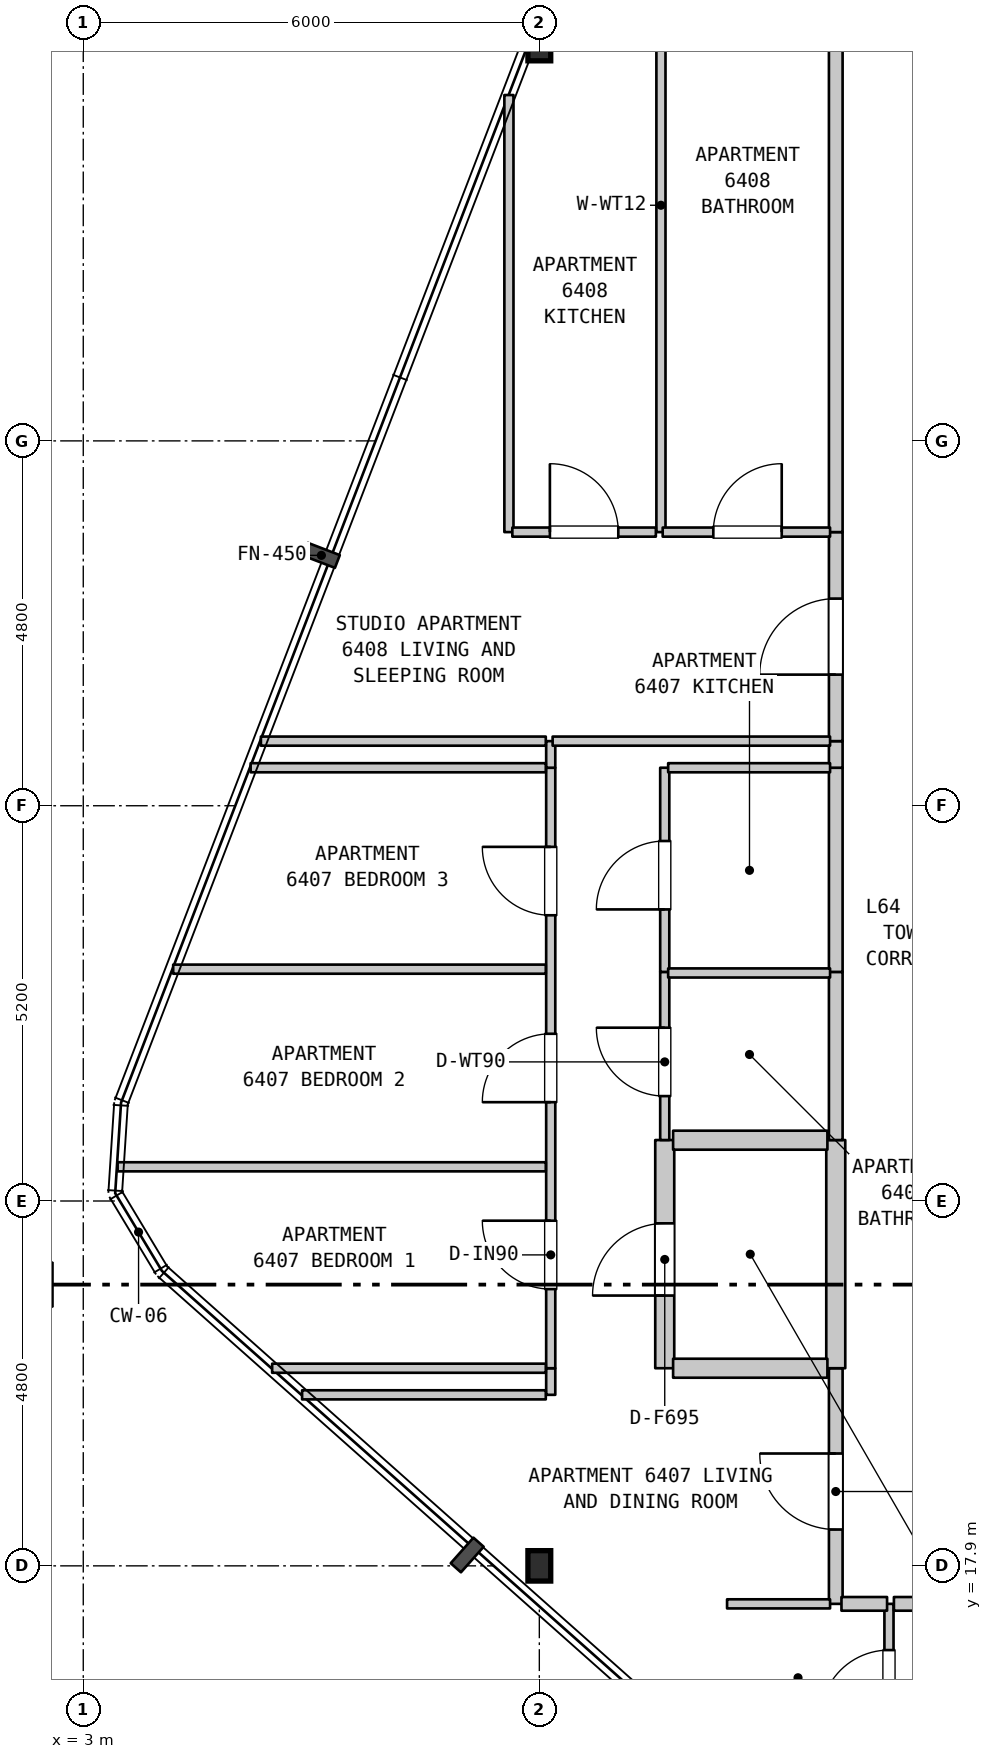
"""IFC4 building model, lengths in metres.
Left out: names, types, materials, properties, quantities, classifications, styles, units other than length and angle.
Written with IfcOpenShell. Run it as: python <this file> out.ifc"""

import sys

from ifc_helpers import new_model, si_unit, direction, frame, frame_2d, origin, origin_2d, place, context, subcontext, project, spatial, rectangle, i_section, extrude, element, fill, save


model = new_model("IFC4")
c1 = context("Model", 3, precision=1e-05, world=origin(), true_north=direction((0.0, 1.0)))
c2 = subcontext(c1, "Body", "Model", "MODEL_VIEW")
j1 = project(units=[si_unit("LENGTHUNIT", "METRE"), si_unit("PLANEANGLEUNIT", "RADIAN")], contexts=[c1])
p1 = place(None, origin())
s1 = spatial("IfcSite", under=j1, at=p1, CompositionType="ELEMENT")
p2 = place(p1, origin())
s2 = spatial("IfcBuilding", under=s1, at=p2, CompositionType="ELEMENT")
p3 = place(p2, frame((0.0, 0.0, 258.4)))
s3 = spatial("IfcBuildingStorey", under=s2, at=p3, CompositionType="ELEMENT", Elevation=258.4)
for number, where, z_axis, x_axis in (
    (1, (9.0, 17.9, 0.0), (0.0, 0.0, 1.0), (1.0, 0.0, 0.0)),
    (2, (9.0, 37.9, 0.0), (0.0, 0.0, 1.0), (1.0, 0.0, 0.0)),
):
    element("IfcColumn", number, at=place(p3, frame(where, z_axis=z_axis, x_axis=x_axis)), inside=s3, PredefinedType="COLUMN", context=c2, shape_type="SweptSolid", body=[
        extrude(i_section(OverallWidth=0.3, OverallDepth=0.4, WebThickness=0.013, FlangeThickness=0.024, FilletRadius=0.027, at=origin_2d()), origin(), (0.0, 0.0, 1.0), 3.7),
    ])
p4 = place(p3, frame((8.6, 31.5, 0.0), z_axis=(0.0, 0.0, 1.0), x_axis=(0.0, 1.0, 0.0)))
e3 = element("IfcWall", 3, at=p4, inside=s3, PredefinedType="PARTITIONING", context=c2, shape_type="SweptSolid", body=[
    extrude(rectangle(XDim=5.75, YDim=0.12, at=frame_2d((2.875, 0.0))), origin(), (0.0, 0.0, 1.0), 3.39),
])
p5 = place(p3, frame((9.15, 20.15, 0.0), z_axis=(0.0, 0.0, 1.0), x_axis=(0.0, 1.0, 0.0)))
e4 = element("IfcWall", 4, at=p5, inside=s3, PredefinedType="PARTITIONING", context=c2, shape_type="SweptSolid", body=[
    extrude(rectangle(XDim=0.35, YDim=0.12, at=frame_2d((0.175, 0.0))), origin(), (0.0, 0.0, 1.0), 3.39),
])
p6 = place(p3, frame((9.15, 20.5, 0.0), z_axis=(0.0, 0.0, 1.0), x_axis=(0.0, 1.0, 0.0)))
e5 = element("IfcWall", 5, at=p6, inside=s3, PredefinedType="PARTITIONING", context=c2, shape_type="SweptSolid", body=[
    extrude(rectangle(XDim=7.9, YDim=0.12, at=frame_2d((3.95, 0.0))), origin(), (0.0, 0.0, 1.0), 2.79),
])
p7 = place(p6, frame((1.041, 0.0, 0.0)))
e6 = element("IfcOpeningElement", 6, at=p7, cuts=e5, PredefinedType="OPENING", context=c2, shape_type="SweptSolid", body=[
    extrude(rectangle(XDim=0.9, YDim=2.15, at=frame_2d((0.45, 1.075))), frame((0.0, 0.07, 0.0), z_axis=(0.0, -1.0, 0.0), x_axis=(1.0, 0.0, 0.0)), (0.0, 0.0, 1.0), 0.14),
])
p8 = place(p6, frame((3.5, 0.0, 0.0)))
e7 = element("IfcOpeningElement", 7, at=p8, cuts=e5, PredefinedType="OPENING", context=c2, shape_type="SweptSolid", body=[
    extrude(rectangle(XDim=0.9, YDim=2.15, at=frame_2d((0.45, 1.075))), frame((0.0, 0.07, 0.0), z_axis=(0.0, -1.0, 0.0), x_axis=(1.0, 0.0, 0.0)), (0.0, 0.0, 1.0), 0.14),
])
p9 = place(p6, frame((5.959, 0.0, 0.0)))
e8 = element("IfcOpeningElement", 8, at=p9, cuts=e5, PredefinedType="OPENING", context=c2, shape_type="SweptSolid", body=[
    extrude(rectangle(XDim=0.9, YDim=2.15, at=frame_2d((0.45, 1.075))), frame((0.0, 0.07, 0.0), z_axis=(0.0, -1.0, 0.0), x_axis=(1.0, 0.0, 0.0)), (0.0, 0.0, 1.0), 0.14),
])
p10 = place(p3, frame((9.15, 28.4, 0.0), z_axis=(0.0, 0.0, 1.0), x_axis=(0.0, 1.0, 0.0)))
e9 = element("IfcWall", 9, at=p10, inside=s3, PredefinedType="PARTITIONING", context=c2, shape_type="SweptSolid", body=[
    extrude(rectangle(XDim=0.35, YDim=0.12, at=frame_2d((0.175, 0.0))), origin(), (0.0, 0.0, 1.0), 3.39),
])
p11 = place(p3, frame((10.6, 31.5, 0.0), z_axis=(0.0, 0.0, 1.0), x_axis=(0.0, 1.0, 0.0)))
e10 = element("IfcWall", 10, at=p11, inside=s3, PredefinedType="PARTITIONING", context=c2, shape_type="SweptSolid", body=[
    extrude(rectangle(XDim=8.6, YDim=0.12, at=frame_2d((4.3, 0.0))), origin(), (0.0, 0.0, 1.0), 3.39),
])
p12 = place(p3, frame((10.65, 20.5, 0.0), z_axis=(0.0, 0.0, 1.0), x_axis=(0.0, 1.0, 0.0)))
e11 = element("IfcWall", 11, at=p12, inside=s3, PredefinedType="STANDARD", context=c2, shape_type="SweptSolid", body=[
    extrude(rectangle(XDim=3.002, YDim=0.25, at=frame_2d((1.501, 0.0))), origin(), (0.0, 0.0, 1.0), 3.39),
])
p13 = place(p12, frame((0.956, 0.0, 0.0)))
e12 = element("IfcOpeningElement", 12, at=p13, cuts=e11, PredefinedType="OPENING", context=c2, shape_type="SweptSolid", body=[
    extrude(rectangle(XDim=0.95, YDim=2.15, at=frame_2d((0.475, 1.075))), frame((0.0, 0.135, 0.0), z_axis=(0.0, -1.0, 0.0), x_axis=(1.0, 0.0, 0.0)), (0.0, 0.0, 1.0), 0.27),
])
p14 = place(p3, frame((10.65, 23.502, 0.0), z_axis=(0.0, 0.0, 1.0), x_axis=(0.0, 1.0, 0.0)))
e13 = element("IfcWall", 13, at=p14, inside=s3, PredefinedType="PARTITIONING", context=c2, shape_type="SweptSolid", body=[
    extrude(rectangle(XDim=2.212, YDim=0.12, at=frame_2d((1.106, 0.0))), origin(), (0.0, 0.0, 1.0), 3.39),
])
p15 = place(p14, frame((0.578, 0.0, 0.0)))
e14 = element("IfcOpeningElement", 14, at=p15, cuts=e13, PredefinedType="OPENING", context=c2, shape_type="SweptSolid", body=[
    extrude(rectangle(XDim=0.9, YDim=2.1, at=frame_2d((0.45, 1.05))), frame((0.0, 0.07, 0.0), z_axis=(0.0, -1.0, 0.0), x_axis=(1.0, 0.0, 0.0)), (0.0, 0.0, 1.0), 0.14),
])
p16 = place(p3, frame((10.65, 25.714, 0.0), z_axis=(0.0, 0.0, 1.0), x_axis=(0.0, 1.0, 0.0)))
e15 = element("IfcWall", 15, at=p16, inside=s3, PredefinedType="PARTITIONING", context=c2, shape_type="SweptSolid", body=[
    extrude(rectangle(XDim=2.686, YDim=0.12, at=frame_2d((1.343, 0.0))), origin(), (0.0, 0.0, 1.0), 3.39),
])
p17 = place(p16, frame((0.822, 0.0, 0.0)))
e16 = element("IfcOpeningElement", 16, at=p17, cuts=e15, PredefinedType="OPENING", context=c2, shape_type="SweptSolid", body=[
    extrude(rectangle(XDim=0.9, YDim=2.15, at=frame_2d((0.45, 1.075))), frame((0.0, 0.07, 0.0), z_axis=(0.0, -1.0, 0.0), x_axis=(1.0, 0.0, 0.0)), (0.0, 0.0, 1.0), 0.14),
])
p18 = place(p3, frame((12.9, 17.4, 0.0), z_axis=(0.0, 0.0, 1.0), x_axis=(0.0, 1.0, 0.0)))
e17 = element("IfcWall", 17, at=p18, inside=s3, PredefinedType="STANDARD", context=c2, shape_type="SweptSolid", body=[
    extrude(rectangle(XDim=3.1, YDim=0.18, at=frame_2d((1.55, 0.0))), origin(), (0.0, 0.0, 1.0), 3.39),
])
p19 = place(p18, frame((0.978, 0.0, 0.0)))
e18 = element("IfcOpeningElement", 18, at=p19, cuts=e17, PredefinedType="OPENING", context=c2, shape_type="SweptSolid", body=[
    extrude(rectangle(XDim=1.0, YDim=2.15, at=frame_2d((0.5, 1.075))), frame((0.0, 0.1, 0.0), z_axis=(0.0, -1.0, 0.0), x_axis=(1.0, 0.0, 0.0)), (0.0, 0.0, 1.0), 0.2),
])
p20 = place(p3, frame((12.9, 20.5, 0.0), z_axis=(0.0, 0.0, 1.0), x_axis=(0.0, 1.0, 0.0)))
e19 = element("IfcWall", 19, at=p20, inside=s3, PredefinedType="STANDARD", context=c2, shape_type="SweptSolid", body=[
    extrude(rectangle(XDim=3.002, YDim=0.25, at=frame_2d((1.501, 0.0))), origin(), (0.0, 0.0, 1.0), 3.39),
])
p21 = place(p3, frame((12.9, 23.502, 0.0), z_axis=(0.0, 0.0, 1.0), x_axis=(0.0, 1.0, 0.0)))
e20 = element("IfcWall", 20, at=p21, inside=s3, PredefinedType="STANDARD", context=c2, shape_type="SweptSolid", body=[
    extrude(rectangle(XDim=2.212, YDim=0.18, at=frame_2d((1.106, 0.0))), origin(), (0.0, 0.0, 1.0), 3.39),
])
p22 = place(p3, frame((12.9, 25.714, 0.0), z_axis=(0.0, 0.0, 1.0), x_axis=(0.0, 1.0, 0.0)))
e21 = element("IfcWall", 21, at=p22, inside=s3, PredefinedType="STANDARD", context=c2, shape_type="SweptSolid", body=[
    extrude(rectangle(XDim=2.686, YDim=0.18, at=frame_2d((1.343, 0.0))), origin(), (0.0, 0.0, 1.0), 3.39),
])
p23 = place(p3, frame((12.9, 28.4, 0.0), z_axis=(0.0, 0.0, 1.0), x_axis=(0.0, 1.0, 0.0)))
e22 = element("IfcWall", 22, at=p23, inside=s3, PredefinedType="STANDARD", context=c2, shape_type="SweptSolid", body=[
    extrude(rectangle(XDim=0.35, YDim=0.18, at=frame_2d((0.175, 0.0))), origin(), (0.0, 0.0, 1.0), 3.39),
])
p24 = place(p3, frame((12.9, 28.75, 0.0), z_axis=(0.0, 0.0, 1.0), x_axis=(0.0, 1.0, 0.0)))
e23 = element("IfcWall", 23, at=p24, inside=s3, PredefinedType="STANDARD", context=c2, shape_type="SweptSolid", body=[
    extrude(rectangle(XDim=2.75, YDim=0.18, at=frame_2d((1.375, 0.0))), origin(), (0.0, 0.0, 1.0), 3.39),
])
p25 = place(p24, frame((0.875, 0.0, 0.0)))
e24 = element("IfcOpeningElement", 24, at=p25, cuts=e23, PredefinedType="OPENING", context=c2, shape_type="SweptSolid", body=[
    extrude(rectangle(XDim=1.0, YDim=2.15, at=frame_2d((0.5, 1.075))), frame((0.0, 0.1, 0.0), z_axis=(0.0, -1.0, 0.0), x_axis=(1.0, 0.0, 0.0)), (0.0, 0.0, 1.0), 0.2),
])
p26 = place(p3, frame((12.9, 31.5, 0.0), z_axis=(0.0, 0.0, 1.0), x_axis=(0.0, 1.0, 0.0)))
e25 = element("IfcWall", 25, at=p26, inside=s3, PredefinedType="STANDARD", context=c2, shape_type="SweptSolid", body=[
    extrude(rectangle(XDim=8.6, YDim=0.18, at=frame_2d((4.3, 0.0))), origin(), (0.0, 0.0, 1.0), 3.39),
])
p27 = place(p3, frame((13.6, 15.45, 0.0), z_axis=(0.0, 0.0, 1.0), x_axis=(0.0, 1.0, 0.0)))
e26 = element("IfcWall", 26, at=p27, inside=s3, PredefinedType="PARTITIONING", context=c2, shape_type="SweptSolid", body=[
    extrude(rectangle(XDim=1.95, YDim=0.12, at=frame_2d((0.975, 0.0))), origin(), (0.0, 0.0, 1.0), 3.39),
])
p28 = place(p27, frame((0.442, 0.0, 0.0)))
e27 = element("IfcOpeningElement", 27, at=p28, cuts=e26, PredefinedType="OPENING", context=c2, shape_type="SweptSolid", body=[
    extrude(rectangle(XDim=0.9, YDim=2.15, at=frame_2d((0.45, 1.075))), frame((0.0, 0.07, 0.0), z_axis=(0.0, -1.0, 0.0), x_axis=(1.0, 0.0, 0.0)), (0.0, 0.0, 1.0), 0.14),
])
p29 = place(p3, frame((11.47, 17.4, 0.0), z_axis=(0.0, 0.0, 1.0), x_axis=(1.0, 0.0, 0.0)))
e28 = element("IfcWall", 28, at=p29, inside=s3, PredefinedType="PARTITIONING", context=c2, shape_type="SweptSolid", body=[
    extrude(rectangle(XDim=1.355, YDim=0.12, at=frame_2d((0.677, 0.0))), origin(), (0.0, 0.0, 1.0), 3.39),
])
p30 = place(p3, frame((12.975, 17.4, 0.0), z_axis=(0.0, 0.0, 1.0), x_axis=(1.0, 0.0, 0.0)))
e29 = element("IfcWall", 29, at=p30, inside=s3, PredefinedType="STANDARD", context=c2, shape_type="SweptSolid", body=[
    extrude(rectangle(XDim=0.6, YDim=0.18, at=frame_2d((0.3, 0.0))), origin(), (0.0, 0.0, 1.0), 3.39),
])
p31 = place(p3, frame((13.665, 17.4, 0.0), z_axis=(0.0, 0.0, 1.0), x_axis=(1.0, 0.0, 0.0)))
e30 = element("IfcWall", 30, at=p31, inside=s3, PredefinedType="STANDARD", context=c2, shape_type="SweptSolid", body=[
    extrude(rectangle(XDim=3.69, YDim=0.18, at=frame_2d((1.845, 0.0))), origin(), (0.0, 0.0, 1.0), 3.39),
])
p32 = place(p31, frame((2.01, 0.0, 0.0)))
e31 = element("IfcOpeningElement", 31, at=p32, cuts=e30, PredefinedType="OPENING", context=c2, shape_type="SweptSolid", body=[
    extrude(rectangle(XDim=1.0, YDim=2.15, at=frame_2d((0.5, 1.075))), frame((0.0, 0.1, 0.0), z_axis=(0.0, -1.0, 0.0), x_axis=(1.0, 0.0, 0.0)), (0.0, 0.0, 1.0), 0.2),
])
p33 = place(p3, frame((5.879, 20.15, 0.0), z_axis=(0.0, 0.0, 1.0), x_axis=(1.0, 0.0, 0.0)))
e32 = element("IfcWall", 32, at=p33, inside=s3, PredefinedType="PARTITIONING", context=c2, shape_type="SweptSolid", body=[
    extrude(rectangle(XDim=3.206, YDim=0.12, at=frame_2d((1.603, 0.0))), origin(), (0.0, 0.0, 1.0), 3.39),
])
p34 = place(p3, frame((5.485, 20.5, 0.0), z_axis=(0.0, 0.0, 1.0), x_axis=(1.0, 0.0, 0.0)))
e33 = element("IfcWall", 33, at=p34, inside=s3, PredefinedType="PARTITIONING", context=c2, shape_type="SweptSolid", body=[
    extrude(rectangle(XDim=3.6, YDim=0.12, at=frame_2d((1.8, 0.0))), origin(), (0.0, 0.0, 1.0), 3.39),
])
p35 = place(p3, frame((10.76, 20.5, 0.0), z_axis=(0.0, 0.0, 1.0), x_axis=(1.0, 0.0, 0.0)))
e34 = element("IfcWall", 34, at=p35, inside=s3, PredefinedType="STANDARD", context=c2, shape_type="SweptSolid", body=[
    extrude(rectangle(XDim=2.03, YDim=0.25, at=frame_2d((1.015, 0.0))), origin(), (0.0, 0.0, 1.0), 3.39),
])
p36 = place(p3, frame((3.452, 23.15, 0.0), z_axis=(0.0, 0.0, 1.0), x_axis=(1.0, 0.0, 0.0)))
e35 = element("IfcWall", 35, at=p36, inside=s3, PredefinedType="PARTITIONING", context=c2, shape_type="SweptSolid", body=[
    extrude(rectangle(XDim=5.633, YDim=0.12, at=frame_2d((2.816, 0.0))), origin(), (0.0, 0.0, 1.0), 3.39),
])
p37 = place(p3, frame((10.76, 23.5, 0.0), z_axis=(0.0, 0.0, 1.0), x_axis=(1.0, 0.0, 0.0)))
e36 = element("IfcWall", 36, at=p37, inside=s3, PredefinedType="STANDARD", context=c2, shape_type="SweptSolid", body=[
    extrude(rectangle(XDim=2.03, YDim=0.25, at=frame_2d((1.015, 0.0))), origin(), (0.0, 0.0, 1.0), 3.39),
])
p38 = place(p3, frame((10.695, 25.7, 0.0), z_axis=(0.0, 0.0, 1.0), x_axis=(1.0, 0.0, 0.0)))
e37 = element("IfcWall", 37, at=p38, inside=s3, PredefinedType="PARTITIONING", context=c2, shape_type="SweptSolid", body=[
    extrude(rectangle(XDim=2.13, YDim=0.12, at=frame_2d((1.065, 0.0))), origin(), (0.0, 0.0, 1.0), 3.39),
])
p39 = place(p3, frame((4.183, 25.75, 0.0), z_axis=(0.0, 0.0, 1.0), x_axis=(1.0, 0.0, 0.0)))
e38 = element("IfcWall", 38, at=p39, inside=s3, PredefinedType="PARTITIONING", context=c2, shape_type="SweptSolid", body=[
    extrude(rectangle(XDim=4.902, YDim=0.12, at=frame_2d((2.451, 0.0))), origin(), (0.0, 0.0, 1.0), 3.39),
])
p40 = place(p3, frame((5.202, 28.4, 0.0), z_axis=(0.0, 0.0, 1.0), x_axis=(1.0, 0.0, 0.0)))
e39 = element("IfcWall", 39, at=p40, inside=s3, PredefinedType="PARTITIONING", context=c2, shape_type="SweptSolid", body=[
    extrude(rectangle(XDim=3.883, YDim=0.12, at=frame_2d((1.941, 0.0))), origin(), (0.0, 0.0, 1.0), 3.39),
])
p41 = place(p3, frame((10.695, 28.4, 0.0), z_axis=(0.0, 0.0, 1.0), x_axis=(1.0, 0.0, 0.0)))
e40 = element("IfcWall", 40, at=p41, inside=s3, PredefinedType="PARTITIONING", context=c2, shape_type="SweptSolid", body=[
    extrude(rectangle(XDim=2.13, YDim=0.12, at=frame_2d((1.065, 0.0))), origin(), (0.0, 0.0, 1.0), 3.39),
])
p42 = place(p3, frame((5.337, 28.75, 0.0), z_axis=(0.0, 0.0, 1.0), x_axis=(1.0, 0.0, 0.0)))
e41 = element("IfcWall", 41, at=p42, inside=s3, PredefinedType="PARTITIONING", context=c2, shape_type="SweptSolid", body=[
    extrude(rectangle(XDim=3.748, YDim=0.12, at=frame_2d((1.874, 0.0))), origin(), (0.0, 0.0, 1.0), 3.39),
])
p43 = place(p3, frame((9.175, 28.75, 0.0), z_axis=(0.0, 0.0, 1.0), x_axis=(1.0, 0.0, 0.0)))
e42 = element("IfcWall", 42, at=p43, inside=s3, PredefinedType="PARTITIONING", context=c2, shape_type="SweptSolid", body=[
    extrude(rectangle(XDim=3.65, YDim=0.12, at=frame_2d((1.825, 0.0))), origin(), (0.0, 0.0, 1.0), 3.39),
])
p44 = place(p3, frame((8.645, 31.5, 0.0), z_axis=(0.0, 0.0, 1.0), x_axis=(1.0, 0.0, 0.0)))
e43 = element("IfcWall", 43, at=p44, inside=s3, PredefinedType="PARTITIONING", context=c2, shape_type="SweptSolid", body=[
    extrude(rectangle(XDim=1.888, YDim=0.12, at=frame_2d((0.944, 0.0))), origin(), (0.0, 0.0, 1.0), 3.39),
])
p45 = place(p44, frame((0.494, 0.0, 0.0)))
e44 = element("IfcOpeningElement", 44, at=p45, cuts=e43, PredefinedType="OPENING", context=c2, shape_type="SweptSolid", body=[
    extrude(rectangle(XDim=0.9, YDim=2.15, at=frame_2d((0.45, 1.075))), frame((0.0, 0.07, 0.0), z_axis=(0.0, -1.0, 0.0), x_axis=(1.0, 0.0, 0.0)), (0.0, 0.0, 1.0), 0.14),
])
p46 = place(p3, frame((10.623, 31.5, 0.0), z_axis=(0.0, 0.0, 1.0), x_axis=(1.0, 0.0, 0.0)))
e45 = element("IfcWall", 45, at=p46, inside=s3, PredefinedType="PARTITIONING", context=c2, shape_type="SweptSolid", body=[
    extrude(rectangle(XDim=2.202, YDim=0.12, at=frame_2d((1.101, 0.0))), origin(), (0.0, 0.0, 1.0), 3.39),
])
p47 = place(p46, frame((0.666, 0.0, 0.0)))
e46 = element("IfcOpeningElement", 46, at=p47, cuts=e45, PredefinedType="OPENING", context=c2, shape_type="SweptSolid", body=[
    extrude(rectangle(XDim=0.9, YDim=2.1, at=frame_2d((0.45, 1.05))), frame((0.0, 0.07, 0.0), z_axis=(0.0, -1.0, 0.0), x_axis=(1.0, 0.0, 0.0)), (0.0, 0.0, 1.0), 0.14),
])
p48 = place(p7, origin())
e47 = element("IfcDoor", 47, at=p48, inside=s3, OperationType="SINGLE_SWING_RIGHT", PredefinedType="DOOR", context=c2, shape_type="SweptSolid", body=[
    extrude(rectangle(XDim=0.9, YDim=2.15, at=frame_2d((0.45, 1.075))), frame((0.0, 0.025, 0.0), z_axis=(0.0, -1.0, 0.0), x_axis=(1.0, 0.0, 0.0)), (0.0, 0.0, 1.0), 0.05),
])
fill(e6, e47)
p49 = place(p8, origin())
e48 = element("IfcDoor", 48, at=p49, inside=s3, OperationType="SINGLE_SWING_LEFT", PredefinedType="DOOR", context=c2, shape_type="SweptSolid", body=[
    extrude(rectangle(XDim=0.9, YDim=2.15, at=frame_2d((0.45, 1.075))), frame((0.0, 0.025, 0.0), z_axis=(0.0, -1.0, 0.0), x_axis=(1.0, 0.0, 0.0)), (0.0, 0.0, 1.0), 0.05),
])
fill(e7, e48)
p50 = place(p9, origin())
e49 = element("IfcDoor", 49, at=p50, inside=s3, OperationType="SINGLE_SWING_RIGHT", PredefinedType="DOOR", context=c2, shape_type="SweptSolid", body=[
    extrude(rectangle(XDim=0.9, YDim=2.15, at=frame_2d((0.45, 1.075))), frame((0.0, 0.025, 0.0), z_axis=(0.0, -1.0, 0.0), x_axis=(1.0, 0.0, 0.0)), (0.0, 0.0, 1.0), 0.05),
])
fill(e8, e49)
p51 = place(p13, origin())
e50 = element("IfcDoor", 50, at=p51, inside=s3, OperationType="SINGLE_SWING_LEFT", PredefinedType="DOOR", context=c2, shape_type="SweptSolid", body=[
    extrude(rectangle(XDim=0.95, YDim=2.15, at=frame_2d((0.475, 1.075))), frame((0.0, 0.025, 0.0), z_axis=(0.0, -1.0, 0.0), x_axis=(1.0, 0.0, 0.0)), (0.0, 0.0, 1.0), 0.05),
])
fill(e12, e50)
p52 = place(p15, origin())
e51 = element("IfcDoor", 51, at=p52, inside=s3, OperationType="SINGLE_SWING_RIGHT", PredefinedType="DOOR", context=c2, shape_type="SweptSolid", body=[
    extrude(rectangle(XDim=0.9, YDim=2.1, at=frame_2d((0.45, 1.05))), frame((0.0, 0.025, 0.0), z_axis=(0.0, -1.0, 0.0), x_axis=(1.0, 0.0, 0.0)), (0.0, 0.0, 1.0), 0.05),
])
fill(e14, e51)
p53 = place(p17, origin())
e52 = element("IfcDoor", 52, at=p53, inside=s3, OperationType="SINGLE_SWING_LEFT", PredefinedType="DOOR", context=c2, shape_type="SweptSolid", body=[
    extrude(rectangle(XDim=0.9, YDim=2.15, at=frame_2d((0.45, 1.075))), frame((0.0, 0.025, 0.0), z_axis=(0.0, -1.0, 0.0), x_axis=(1.0, 0.0, 0.0)), (0.0, 0.0, 1.0), 0.05),
])
fill(e16, e52)
p54 = place(p19, origin())
e53 = element("IfcDoor", 53, at=p54, inside=s3, OperationType="SINGLE_SWING_RIGHT", PredefinedType="DOOR", context=c2, shape_type="SweptSolid", body=[
    extrude(rectangle(XDim=1.0, YDim=2.15, at=frame_2d((0.5, 1.075))), frame((0.0, 0.025, 0.0), z_axis=(0.0, -1.0, 0.0), x_axis=(1.0, 0.0, 0.0)), (0.0, 0.0, 1.0), 0.05),
])
fill(e18, e53)
p55 = place(p25, origin())
e54 = element("IfcDoor", 54, at=p55, inside=s3, OperationType="SINGLE_SWING_LEFT", PredefinedType="DOOR", context=c2, shape_type="SweptSolid", body=[
    extrude(rectangle(XDim=1.0, YDim=2.15, at=frame_2d((0.5, 1.075))), frame((0.0, 0.025, 0.0), z_axis=(0.0, -1.0, 0.0), x_axis=(1.0, 0.0, 0.0)), (0.0, 0.0, 1.0), 0.05),
])
fill(e24, e54)
p56 = place(p28, origin())
e55 = element("IfcDoor", 55, at=p56, inside=s3, OperationType="SINGLE_SWING_LEFT", PredefinedType="DOOR", context=c2, shape_type="SweptSolid", body=[
    extrude(rectangle(XDim=0.9, YDim=2.15, at=frame_2d((0.45, 1.075))), frame((0.0, 0.025, 0.0), z_axis=(0.0, -1.0, 0.0), x_axis=(1.0, 0.0, 0.0)), (0.0, 0.0, 1.0), 0.05),
])
fill(e27, e55)
p57 = place(p45, origin())
e56 = element("IfcDoor", 56, at=p57, inside=s3, OperationType="SINGLE_SWING_LEFT", PredefinedType="DOOR", context=c2, shape_type="SweptSolid", body=[
    extrude(rectangle(XDim=0.9, YDim=2.15, at=frame_2d((0.45, 1.075))), frame((0.0, 0.025, 0.0), z_axis=(0.0, -1.0, 0.0), x_axis=(1.0, 0.0, 0.0)), (0.0, 0.0, 1.0), 0.05),
])
fill(e44, e56)
p58 = place(p47, origin())
e57 = element("IfcDoor", 57, at=p58, inside=s3, OperationType="SINGLE_SWING_RIGHT", PredefinedType="DOOR", context=c2, shape_type="SweptSolid", body=[
    extrude(rectangle(XDim=0.9, YDim=2.1, at=frame_2d((0.45, 1.05))), frame((0.0, 0.025, 0.0), z_axis=(0.0, -1.0, 0.0), x_axis=(1.0, 0.0, 0.0)), (0.0, 0.0, 1.0), 0.05),
])
fill(e46, e57)
save(model, sys.argv[1])
